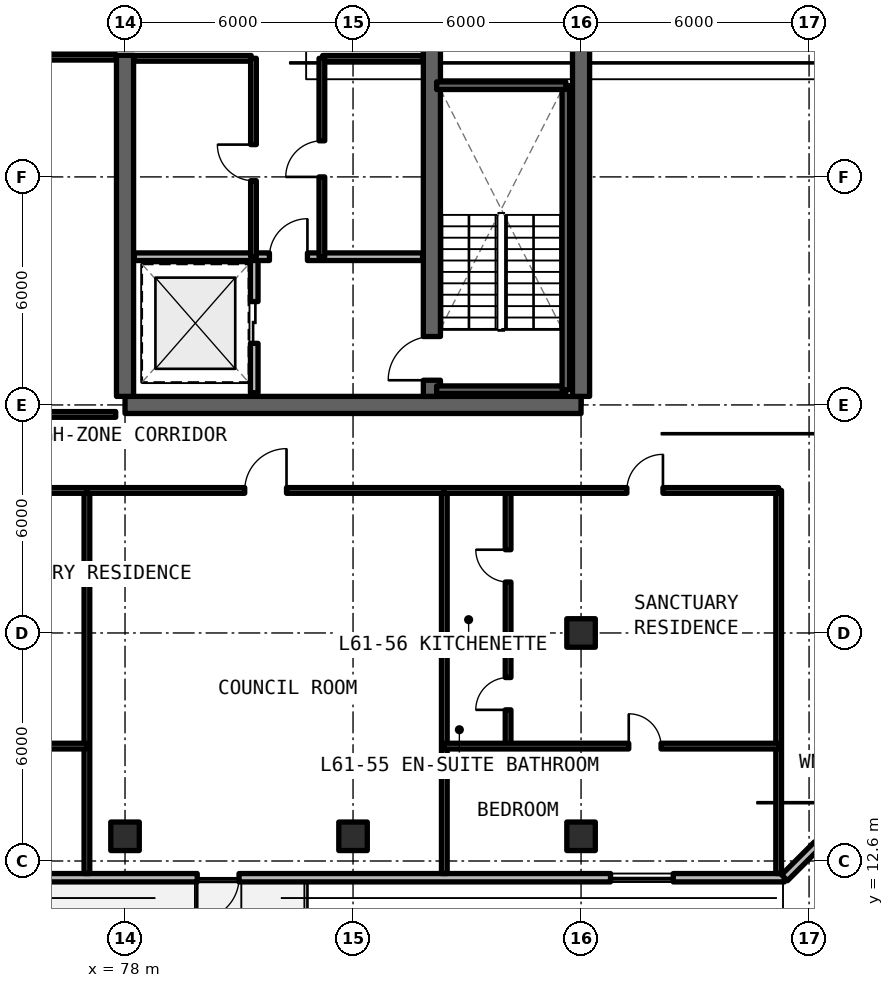
"""IFC4 building model, lengths in metres.
Left out: names, types, materials, properties, quantities, classifications, styles, units other than length and angle.
Written with IfcOpenShell. Run it as: python <this file> out.ifc"""

import sys

from ifc_helpers import new_model, si_unit, direction, frame, frame_2d, origin, origin_2d, place, context, subcontext, project, spatial, rectangle, extrude, element, fill, save


model = new_model("IFC4")
c1 = context("Model", 3, precision=1e-05, world=origin(), true_north=direction((0.0, 1.0)))
c2 = subcontext(c1, "Body", "Model", "MODEL_VIEW")
j1 = project(units=[si_unit("LENGTHUNIT", "METRE"), si_unit("PLANEANGLEUNIT", "RADIAN")], contexts=[c1])
p1 = place(None, origin())
s1 = spatial("IfcSite", under=j1, at=p1, CompositionType="ELEMENT")
p2 = place(p1, origin())
s2 = spatial("IfcBuilding", under=s1, at=p2, CompositionType="ELEMENT")
p3 = place(p2, frame((0.0, 0.0, 219.12)))
s3 = spatial("IfcBuildingStorey", under=s2, at=p3, CompositionType="ELEMENT", Elevation=219.12)
p4 = place(p3, frame((78.0, 24.6, 0.0), z_axis=(0.0, 0.0, 1.0), x_axis=(1.0, 0.0, 0.0)))
e1 = element("IfcWall", 1, at=p4, inside=s3, PredefinedType="SHEAR", context=c2, shape_type="SweptSolid", body=[
    extrude(rectangle(XDim=12.0, YDim=0.45, at=frame_2d((6.0, 0.0))), origin(), (0.0, 0.0, 1.0), 3.63),
])
p5 = place(p3, frame((90.0, 24.825, 0.0), z_axis=(0.0, 0.0, 1.0), x_axis=(0.0, 1.0, 0.0)))
e2 = element("IfcWall", 2, at=p5, inside=s3, PredefinedType="SHEAR", context=c2, shape_type="SweptSolid", body=[
    extrude(rectangle(XDim=17.55, YDim=0.45, at=frame_2d((8.775, 0.0))), origin(), (0.0, 0.0, 1.0), 3.63),
])
p6 = place(p3, frame((78.0, 24.825, 0.0), z_axis=(0.0, 0.0, 1.0), x_axis=(0.0, 1.0, 0.0)))
e3 = element("IfcWall", 3, at=p6, inside=s3, PredefinedType="SHEAR", context=c2, shape_type="SweptSolid", body=[
    extrude(rectangle(XDim=8.975, YDim=0.45, at=frame_2d((4.488, 0.0))), origin(), (0.0, 0.0, 1.0), 3.63),
])
p7 = place(p3, frame((86.075, 24.825, 0.0), z_axis=(0.0, 0.0, 1.0), x_axis=(0.0, 1.0, 0.0)))
e4 = element("IfcWall", 4, at=p7, inside=s3, PredefinedType="SHEAR", context=c2, shape_type="SweptSolid", body=[
    extrude(rectangle(XDim=17.55, YDim=0.45, at=frame_2d((8.775, 0.0))), origin(), (0.0, 0.0, 1.0), 3.63),
])
p8 = place(p7, frame((0.425, 0.0, 0.0)))
e5 = element("IfcOpeningElement", 5, at=p8, cuts=e4, PredefinedType="OPENING", context=c2, shape_type="SweptSolid", body=[
    extrude(rectangle(XDim=1.15, YDim=2.15, at=frame_2d((0.575, 1.075))), frame((0.0, 0.235, 0.0), z_axis=(0.0, -1.0, 0.0), x_axis=(1.0, 0.0, 0.0)), (0.0, 0.0, 1.0), 0.47),
])
p9 = place(p7, frame((9.625, 0.0, 0.0)))
e6 = element("IfcOpeningElement", 6, at=p9, cuts=e4, PredefinedType="OPENING", context=c2, shape_type="SweptSolid", body=[
    extrude(rectangle(XDim=1.15, YDim=2.15, at=frame_2d((0.575, 1.075))), frame((0.0, 0.235, 0.0), z_axis=(0.0, -1.0, 0.0), x_axis=(1.0, 0.0, 0.0)), (0.0, 0.0, 1.0), 0.47),
])
for number, where, z_axis, x_axis in (
    (7, (90.0, 18.6, 0.0), (0.0, 0.0, 1.0), (1.0, 0.0, 0.0)),
    (8, (78.0, 13.25, 0.0), (0.0, 0.0, 1.0), (1.0, 0.0, 0.0)),
    (9, (84.0, 13.25, 0.0), (0.0, 0.0, 1.0), (1.0, 0.0, 0.0)),
    (10, (90.0, 13.25, 0.0), (0.0, 0.0, 1.0), (1.0, 0.0, 0.0)),
):
    element("IfcColumn", number, at=place(p3, frame(where, z_axis=z_axis, x_axis=x_axis)), inside=s3, PredefinedType="COLUMN", context=c2, shape_type="SweptSolid", body=[
        extrude(rectangle(XDim=0.75, YDim=0.75, at=origin_2d()), origin(), (0.0, 0.0, 1.0), 3.63),
    ])
p10 = place(p3, frame((52.11, 12.16, 0.0), z_axis=(0.0, 0.0, 1.0), x_axis=(1.0, 0.0, 0.0)))
e11 = element("IfcWall", 11, at=p10, inside=s3, PredefinedType="SOLIDWALL", context=c2, shape_type="SweptSolid", body=[
    extrude(rectangle(XDim=43.244, YDim=0.22, at=frame_2d((21.622, 0.0))), origin(), (0.0, 0.0, 1.0), 3.41),
])
p11 = place(p10, frame((16.69, 0.0, 0.0)))
e12 = element("IfcOpeningElement", 12, at=p11, cuts=e11, PredefinedType="OPENING", context=c2, shape_type="SweptSolid", body=[
    extrude(rectangle(XDim=1.1, YDim=2.15, at=frame_2d((0.55, 1.075))), frame((0.0, 0.12, 0.0), z_axis=(0.0, -1.0, 0.0), x_axis=(1.0, 0.0, 0.0)), (0.0, 0.0, 1.0), 0.24),
])
p12 = place(p10, frame((27.79, 0.0, 0.0)))
e13 = element("IfcOpeningElement", 13, at=p12, cuts=e11, PredefinedType="OPENING", context=c2, shape_type="SweptSolid", body=[
    extrude(rectangle(XDim=1.1, YDim=2.15, at=frame_2d((0.55, 1.075))), frame((0.0, 0.12, 0.0), z_axis=(0.0, -1.0, 0.0), x_axis=(1.0, 0.0, 0.0)), (0.0, 0.0, 1.0), 0.24),
])
p13 = place(p10, frame((2.826, 0.0, 0.78)))
e14 = element("IfcOpeningElement", 14, at=p13, cuts=e11, PredefinedType="OPENING", context=c2, shape_type="SweptSolid", body=[
    extrude(rectangle(XDim=1.65, YDim=1.66, at=frame_2d((0.825, 0.83))), frame((0.0, 0.12, 0.0), z_axis=(0.0, -1.0, 0.0), x_axis=(1.0, 0.0, 0.0)), (0.0, 0.0, 1.0), 0.24),
])
p14 = place(p10, frame((10.865, 0.0, 0.78)))
e15 = element("IfcOpeningElement", 15, at=p14, cuts=e11, PredefinedType="OPENING", context=c2, shape_type="SweptSolid", body=[
    extrude(rectangle(XDim=1.65, YDim=1.66, at=frame_2d((0.825, 0.83))), frame((0.0, 0.12, 0.0), z_axis=(0.0, -1.0, 0.0), x_axis=(1.0, 0.0, 0.0)), (0.0, 0.0, 1.0), 0.24),
])
p15 = place(p10, frame((38.666, 0.0, 0.78)))
e16 = element("IfcOpeningElement", 16, at=p15, cuts=e11, PredefinedType="OPENING", context=c2, shape_type="SweptSolid", body=[
    extrude(rectangle(XDim=1.65, YDim=1.66, at=frame_2d((0.825, 0.83))), frame((0.0, 0.12, 0.0), z_axis=(0.0, -1.0, 0.0), x_axis=(1.0, 0.0, 0.0)), (0.0, 0.0, 1.0), 0.24),
])
p16 = place(p3, frame((95.354, 12.16, 0.0), z_axis=(0.0, 0.0, 1.0), x_axis=(0.707085909342, 0.707127652415, 0.0)))
e17 = element("IfcWall", 17, at=p16, inside=s3, PredefinedType="SOLIDWALL", context=c2, shape_type="SweptSolid", body=[
    extrude(rectangle(XDim=5.849, YDim=0.22, at=frame_2d((2.924, 0.0))), origin(), (0.0, 0.0, 1.0), 3.41),
])
p17 = place(p16, frame((1.224, 0.0, 0.78)))
e18 = element("IfcOpeningElement", 18, at=p17, cuts=e17, PredefinedType="OPENING", context=c2, shape_type="SweptSolid", body=[
    extrude(rectangle(XDim=3.4, YDim=1.66, at=frame_2d((1.7, 0.83))), frame((0.0, 0.12, 0.0), z_axis=(0.0, -1.0, 0.0), x_axis=(1.0, 0.0, 0.0)), (0.0, 0.0, 1.0), 0.24),
])
p18 = place(p3, frame((81.4, 24.92, 0.0), z_axis=(0.0, 0.0, 1.0), x_axis=(0.0, 1.0, 0.0)))
e19 = element("IfcWall", 19, at=p18, inside=s3, PredefinedType="SOLIDWALL", context=c2, shape_type="SweptSolid", body=[
    extrude(rectangle(XDim=3.58, YDim=0.2, at=frame_2d((1.79, 0.0))), origin(), (0.0, 0.0, 1.0), 2.63),
])
p19 = place(p18, frame((1.3, 0.0, 0.0)))
e20 = element("IfcOpeningElement", 20, at=p19, cuts=e19, PredefinedType="OPENING", context=c2, shape_type="SweptSolid", body=[
    extrude(rectangle(XDim=1.1, YDim=2.2, at=frame_2d((0.55, 1.1))), frame((0.0, 0.11, 0.0), z_axis=(0.0, -1.0, 0.0), x_axis=(1.0, 0.0, 0.0)), (0.0, 0.0, 1.0), 0.22),
])
p20 = place(p3, frame((78.245, 28.5, 0.0), z_axis=(0.0, 0.0, 1.0), x_axis=(1.0, 0.0, 0.0)))
e21 = element("IfcWall", 21, at=p20, inside=s3, PredefinedType="SOLIDWALL", context=c2, shape_type="SweptSolid", body=[
    extrude(rectangle(XDim=7.585, YDim=0.2, at=frame_2d((3.792, 0.0))), origin(), (0.0, 0.0, 1.0), 2.63),
])
p21 = place(p20, frame((3.555, 0.0, 0.0)))
e22 = element("IfcOpeningElement", 22, at=p21, cuts=e21, PredefinedType="OPENING", context=c2, shape_type="SweptSolid", body=[
    extrude(rectangle(XDim=1.0, YDim=2.15, at=frame_2d((0.5, 1.075))), frame((0.0, 0.11, 0.0), z_axis=(0.0, -1.0, 0.0), x_axis=(1.0, 0.0, 0.0)), (0.0, 0.0, 1.0), 0.22),
])
p22 = place(p3, frame((83.2, 33.72, 0.0), z_axis=(0.0, 0.0, 1.0), x_axis=(1.0, 0.0, 0.0)))
e23 = element("IfcWall", 23, at=p22, inside=s3, PredefinedType="SOLIDWALL", context=c2, shape_type="SweptSolid", body=[
    extrude(rectangle(XDim=2.63, YDim=0.15, at=frame_2d((1.315, 0.0))), origin(), (0.0, 0.0, 1.0), 2.63),
])
p23 = place(p3, frame((83.18, 28.5, 0.0), z_axis=(0.0, 0.0, 1.0), x_axis=(0.0, 1.0, 0.0)))
e24 = element("IfcWall", 24, at=p23, inside=s3, PredefinedType="SOLIDWALL", context=c2, shape_type="SweptSolid", body=[
    extrude(rectangle(XDim=5.22, YDim=0.15, at=frame_2d((2.61, 0.0))), origin(), (0.0, 0.0, 1.0), 2.63),
])
p24 = place(p23, frame((2.1, 0.0, 0.0)))
e25 = element("IfcOpeningElement", 25, at=p24, cuts=e24, PredefinedType="OPENING", context=c2, shape_type="SweptSolid", body=[
    extrude(rectangle(XDim=0.95, YDim=2.15, at=frame_2d((0.475, 1.075))), frame((0.0, 0.085, 0.0), z_axis=(0.0, -1.0, 0.0), x_axis=(1.0, 0.0, 0.0)), (0.0, 0.0, 1.0), 0.17),
])
p25 = place(p3, frame((78.245, 33.72, 0.0), z_axis=(0.0, 0.0, 1.0), x_axis=(1.0, 0.0, 0.0)))
e26 = element("IfcWall", 26, at=p25, inside=s3, PredefinedType="SOLIDWALL", context=c2, shape_type="SweptSolid", body=[
    extrude(rectangle(XDim=3.075, YDim=0.15, at=frame_2d((1.538, 0.0))), origin(), (0.0, 0.0, 1.0), 2.63),
])
p26 = place(p3, frame((81.38, 28.5, 0.0), z_axis=(0.0, 0.0, 1.0), x_axis=(0.0, 1.0, 0.0)))
e27 = element("IfcWall", 27, at=p26, inside=s3, PredefinedType="SOLIDWALL", context=c2, shape_type="SweptSolid", body=[
    extrude(rectangle(XDim=5.22, YDim=0.15, at=frame_2d((2.61, 0.0))), origin(), (0.0, 0.0, 1.0), 2.63),
])
p27 = place(p26, frame((2.0, 0.0, 0.0)))
e28 = element("IfcOpeningElement", 28, at=p27, cuts=e27, PredefinedType="OPENING", context=c2, shape_type="SweptSolid", body=[
    extrude(rectangle(XDim=0.95, YDim=2.15, at=frame_2d((0.475, 1.075))), frame((0.0, 0.085, 0.0), z_axis=(0.0, -1.0, 0.0), x_axis=(1.0, 0.0, 0.0)), (0.0, 0.0, 1.0), 0.17),
])
p28 = place(p3, frame((69.85, 24.35, 0.0), z_axis=(0.0, 0.0, 1.0), x_axis=(1.0, 0.0, 0.0)))
e29 = element("IfcWall", 29, at=p28, inside=s3, PredefinedType="SOLIDWALL", context=c2, shape_type="SweptSolid", body=[
    extrude(rectangle(XDim=7.905, YDim=0.15, at=frame_2d((3.952, 0.0))), origin(), (0.0, 0.0, 1.0), 2.63),
])
p29 = place(p3, frame((69.85, 33.75, 0.0), z_axis=(0.0, 0.0, 1.0), x_axis=(1.0, 0.0, 0.0)))
e30 = element("IfcWall", 30, at=p29, inside=s3, PredefinedType="SOLIDWALL", context=c2, shape_type="SweptSolid", body=[
    extrude(rectangle(XDim=7.905, YDim=0.15, at=frame_2d((3.952, 0.0))), origin(), (0.0, 0.0, 1.0), 2.63),
])
p30 = place(p29, frame((3.478, 0.0, 0.0)))
e31 = element("IfcOpeningElement", 31, at=p30, cuts=e30, PredefinedType="OPENING", context=c2, shape_type="SweptSolid", body=[
    extrude(rectangle(XDim=0.95, YDim=2.15, at=frame_2d((0.475, 1.075))), frame((0.0, 0.085, 0.0), z_axis=(0.0, -1.0, 0.0), x_axis=(1.0, 0.0, 0.0)), (0.0, 0.0, 1.0), 0.17),
])
for number, where, z_axis, x_axis in (
    (32, (95.2, 12.27, 0.0), (0.0, 0.0, 1.0), (0.0, 1.0, 0.0)),
    (33, (76.997, 12.27, 0.0), (0.0, 0.0, 1.0), (0.0, 1.0, 0.0)),
):
    element("IfcWall", number, at=place(p3, frame(where, z_axis=z_axis, x_axis=x_axis)), inside=s3, PredefinedType="SOLIDWALL", context=c2, shape_type="SweptSolid", body=[
        extrude(rectangle(XDim=10.08, YDim=0.15, at=frame_2d((5.04, 0.0))), origin(), (0.0, 0.0, 1.0), 2.63),
    ])
p31 = place(p3, frame((68.199, 15.623, 0.0), z_axis=(0.0, 0.0, 1.0), x_axis=(1.0, 0.0, 0.0)))
e34 = element("IfcWall", 34, at=p31, inside=s3, PredefinedType="PARTITIONING", context=c2, shape_type="SweptSolid", body=[
    extrude(rectangle(XDim=8.798, YDim=0.15, at=frame_2d((4.399, 0.0))), origin(), (0.0, 0.0, 1.0), 2.63),
])
p32 = place(p31, frame((4.954, 0.0, 0.0)))
e35 = element("IfcOpeningElement", 35, at=p32, cuts=e34, PredefinedType="OPENING", context=c2, shape_type="SweptSolid", body=[
    extrude(rectangle(XDim=0.85, YDim=2.1, at=frame_2d((0.425, 1.05))), frame((0.0, 0.085, 0.0), z_axis=(0.0, -1.0, 0.0), x_axis=(1.0, 0.0, 0.0)), (0.0, 0.0, 1.0), 0.17),
])
p33 = place(p3, frame((68.199, 22.35, 0.0), z_axis=(0.0, 0.0, 1.0), x_axis=(1.0, 0.0, 0.0)))
e36 = element("IfcWall", 36, at=p33, inside=s3, PredefinedType="SOLIDWALL", context=c2, shape_type="SweptSolid", body=[
    extrude(rectangle(XDim=8.798, YDim=0.15, at=frame_2d((4.399, 0.0))), origin(), (0.0, 0.0, 1.0), 2.63),
])
p34 = place(p33, frame((4.904, 0.0, 0.0)))
e37 = element("IfcOpeningElement", 37, at=p34, cuts=e36, PredefinedType="OPENING", context=c2, shape_type="SweptSolid", body=[
    extrude(rectangle(XDim=0.95, YDim=2.15, at=frame_2d((0.475, 1.075))), frame((0.0, 0.085, 0.0), z_axis=(0.0, -1.0, 0.0), x_axis=(1.0, 0.0, 0.0)), (0.0, 0.0, 1.0), 0.17),
])
p35 = place(p3, frame((86.402, 12.27, 0.0), z_axis=(0.0, 0.0, 1.0), x_axis=(0.0, 1.0, 0.0)))
e38 = element("IfcWall", 38, at=p35, inside=s3, PredefinedType="SOLIDWALL", context=c2, shape_type="SweptSolid", body=[
    extrude(rectangle(XDim=10.08, YDim=0.15, at=frame_2d((5.04, 0.0))), origin(), (0.0, 0.0, 1.0), 2.63),
])
p36 = place(p3, frame((76.997, 22.35, 0.0), z_axis=(0.0, 0.0, 1.0), x_axis=(1.0, 0.0, 0.0)))
e39 = element("IfcWall", 39, at=p36, inside=s3, PredefinedType="SOLIDWALL", context=c2, shape_type="SweptSolid", body=[
    extrude(rectangle(XDim=9.405, YDim=0.15, at=frame_2d((4.702, 0.0))), origin(), (0.0, 0.0, 1.0), 2.63),
])
p37 = place(p36, frame((4.152, 0.0, 0.0)))
e40 = element("IfcOpeningElement", 40, at=p37, cuts=e39, PredefinedType="OPENING", context=c2, shape_type="SweptSolid", body=[
    extrude(rectangle(XDim=1.1, YDim=2.15, at=frame_2d((0.55, 1.075))), frame((0.0, 0.085, 0.0), z_axis=(0.0, -1.0, 0.0), x_axis=(1.0, 0.0, 0.0)), (0.0, 0.0, 1.0), 0.17),
])
p38 = place(p3, frame((86.402, 18.381, 0.0), z_axis=(0.0, 0.0, 1.0), x_axis=(1.0, 0.0, 0.0)))
e41 = element("IfcWall", 41, at=p38, inside=s3, PredefinedType="PARTITIONING", context=c2, shape_type="SweptSolid", body=[
    extrude(rectangle(XDim=1.678, YDim=0.15, at=frame_2d((0.839, 0.0))), origin(), (0.0, 0.0, 1.0), 2.63),
])
p39 = place(p3, frame((88.08, 15.623, 0.0), z_axis=(0.0, 0.0, 1.0), x_axis=(0.0, 1.0, 0.0)))
e42 = element("IfcWall", 42, at=p39, inside=s3, PredefinedType="PARTITIONING", context=c2, shape_type="SweptSolid", body=[
    extrude(rectangle(XDim=6.727, YDim=0.15, at=frame_2d((3.364, 0.0))), origin(), (0.0, 0.0, 1.0), 2.63),
])
p40 = place(p39, frame((0.954, 0.0, 0.0)))
e43 = element("IfcOpeningElement", 43, at=p40, cuts=e42, PredefinedType="OPENING", context=c2, shape_type="SweptSolid", body=[
    extrude(rectangle(XDim=0.85, YDim=2.1, at=frame_2d((0.425, 1.05))), frame((0.0, 0.085, 0.0), z_axis=(0.0, -1.0, 0.0), x_axis=(1.0, 0.0, 0.0)), (0.0, 0.0, 1.0), 0.17),
])
p41 = place(p39, frame((4.318, 0.0, 0.0)))
e44 = element("IfcOpeningElement", 44, at=p41, cuts=e42, PredefinedType="OPENING", context=c2, shape_type="SweptSolid", body=[
    extrude(rectangle(XDim=0.85, YDim=2.1, at=frame_2d((0.425, 1.05))), frame((0.0, 0.085, 0.0), z_axis=(0.0, -1.0, 0.0), x_axis=(1.0, 0.0, 0.0)), (0.0, 0.0, 1.0), 0.17),
])
p42 = place(p3, frame((86.402, 15.623, 0.0), z_axis=(0.0, 0.0, 1.0), x_axis=(1.0, 0.0, 0.0)))
e45 = element("IfcWall", 45, at=p42, inside=s3, PredefinedType="PARTITIONING", context=c2, shape_type="SweptSolid", body=[
    extrude(rectangle(XDim=8.798, YDim=0.15, at=frame_2d((4.399, 0.0))), origin(), (0.0, 0.0, 1.0), 2.63),
])
p43 = place(p42, frame((4.853, 0.0, 0.0)))
e46 = element("IfcOpeningElement", 46, at=p43, cuts=e45, PredefinedType="OPENING", context=c2, shape_type="SweptSolid", body=[
    extrude(rectangle(XDim=0.85, YDim=2.1, at=frame_2d((0.425, 1.05))), frame((0.0, 0.085, 0.0), z_axis=(0.0, -1.0, 0.0), x_axis=(1.0, 0.0, 0.0)), (0.0, 0.0, 1.0), 0.17),
])
p44 = place(p3, frame((86.402, 22.35, 0.0), z_axis=(0.0, 0.0, 1.0), x_axis=(1.0, 0.0, 0.0)))
e47 = element("IfcWall", 47, at=p44, inside=s3, PredefinedType="SOLIDWALL", context=c2, shape_type="SweptSolid", body=[
    extrude(rectangle(XDim=8.798, YDim=0.15, at=frame_2d((4.399, 0.0))), origin(), (0.0, 0.0, 1.0), 2.63),
])
p45 = place(p44, frame((4.803, 0.0, 0.0)))
e48 = element("IfcOpeningElement", 48, at=p45, cuts=e47, PredefinedType="OPENING", context=c2, shape_type="SweptSolid", body=[
    extrude(rectangle(XDim=0.95, YDim=2.15, at=frame_2d((0.475, 1.075))), frame((0.0, 0.085, 0.0), z_axis=(0.0, -1.0, 0.0), x_axis=(1.0, 0.0, 0.0)), (0.0, 0.0, 1.0), 0.17),
])
p46 = place(p3, frame((86.2, 25.0, 0.0), z_axis=(0.0, 0.0, 1.0), x_axis=(1.0, 0.0, 0.0)))
e49 = element("IfcWall", 49, at=p46, inside=s3, PredefinedType="SOLIDWALL", context=c2, shape_type="SweptSolid", body=[
    extrude(rectangle(XDim=3.4, YDim=0.2, at=frame_2d((1.7, 0.0))), origin(), (0.0, 0.0, 1.0), 3.63),
])
p47 = place(p3, frame((89.6, 25.0, 0.0), z_axis=(0.0, 0.0, 1.0), x_axis=(0.0, 1.0, 0.0)))
e50 = element("IfcWall", 50, at=p47, inside=s3, PredefinedType="SOLIDWALL", context=c2, shape_type="SweptSolid", body=[
    extrude(rectangle(XDim=8.0, YDim=0.2, at=frame_2d((4.0, 0.0))), origin(), (0.0, 0.0, 1.0), 3.63),
])
p48 = place(p3, frame((89.6, 33.0, 0.0), z_axis=(0.0, 0.0, 1.0), x_axis=(-1.0, 0.0, 0.0)))
e51 = element("IfcWall", 51, at=p48, inside=s3, PredefinedType="SOLIDWALL", context=c2, shape_type="SweptSolid", body=[
    extrude(rectangle(XDim=3.4, YDim=0.2, at=frame_2d((1.7, 0.0))), origin(), (0.0, 0.0, 1.0), 3.63),
])
p49 = place(p12, frame((1.1, 0.0, 0.0), z_axis=(0.0, 0.0, 1.0), x_axis=(-1.0, 0.0, 0.0)))
e52 = element("IfcDoor", 52, at=p49, inside=s3, OperationType="SINGLE_SWING_LEFT", PredefinedType="DOOR", context=c2, shape_type="SweptSolid", body=[
    extrude(rectangle(XDim=1.1, YDim=2.15, at=frame_2d((0.55, 1.075))), frame((0.0, 0.025, 0.0), z_axis=(0.0, -1.0, 0.0), x_axis=(1.0, 0.0, 0.0)), (0.0, 0.0, 1.0), 0.05),
])
fill(e13, e52)
p50 = place(p15, origin())
e53 = element("IfcWindow", 53, at=p50, inside=s3, PartitioningType="SINGLE_PANEL", PredefinedType="WINDOW", context=c2, shape_type="SweptSolid", body=[
    extrude(rectangle(XDim=1.65, YDim=1.66, at=frame_2d((0.825, 0.83))), frame((0.0, 0.03, 0.0), z_axis=(0.0, -1.0, 0.0), x_axis=(1.0, 0.0, 0.0)), (0.0, 0.0, 1.0), 0.06),
])
fill(e16, e53)
p51 = place(p19, origin())
e54 = element("IfcDoor", 54, at=p51, inside=s3, OperationType="SLIDING_TO_LEFT", PredefinedType="DOOR", context=c2, shape_type="SweptSolid", body=[
    extrude(rectangle(XDim=1.1, YDim=2.2, at=frame_2d((0.55, 1.1))), frame((0.0, 0.025, 0.0), z_axis=(0.0, -1.0, 0.0), x_axis=(1.0, 0.0, 0.0)), (0.0, 0.0, 1.0), 0.05),
])
fill(e20, e54)
p52 = place(p21, origin())
e55 = element("IfcDoor", 55, at=p52, inside=s3, OperationType="SINGLE_SWING_RIGHT", PredefinedType="DOOR", context=c2, shape_type="SweptSolid", body=[
    extrude(rectangle(XDim=1.0, YDim=2.15, at=frame_2d((0.5, 1.075))), frame((0.0, 0.025, 0.0), z_axis=(0.0, -1.0, 0.0), x_axis=(1.0, 0.0, 0.0)), (0.0, 0.0, 1.0), 0.05),
])
fill(e22, e55)
p53 = place(p24, origin())
e56 = element("IfcDoor", 56, at=p53, inside=s3, OperationType="SINGLE_SWING_LEFT", PredefinedType="DOOR", context=c2, shape_type="SweptSolid", body=[
    extrude(rectangle(XDim=0.95, YDim=2.15, at=frame_2d((0.475, 1.075))), frame((0.0, 0.025, 0.0), z_axis=(0.0, -1.0, 0.0), x_axis=(1.0, 0.0, 0.0)), (0.0, 0.0, 1.0), 0.05),
])
fill(e25, e56)
p54 = place(p27, origin())
e57 = element("IfcDoor", 57, at=p54, inside=s3, OperationType="SINGLE_SWING_RIGHT", PredefinedType="DOOR", context=c2, shape_type="SweptSolid", body=[
    extrude(rectangle(XDim=0.95, YDim=2.15, at=frame_2d((0.475, 1.075))), frame((0.0, 0.025, 0.0), z_axis=(0.0, -1.0, 0.0), x_axis=(1.0, 0.0, 0.0)), (0.0, 0.0, 1.0), 0.05),
])
fill(e28, e57)
p55 = place(p37, origin())
e58 = element("IfcDoor", 58, at=p55, inside=s3, OperationType="SINGLE_SWING_RIGHT", PredefinedType="DOOR", context=c2, shape_type="SweptSolid", body=[
    extrude(rectangle(XDim=1.1, YDim=2.15, at=frame_2d((0.55, 1.075))), frame((0.0, 0.025, 0.0), z_axis=(0.0, -1.0, 0.0), x_axis=(1.0, 0.0, 0.0)), (0.0, 0.0, 1.0), 0.05),
])
fill(e40, e58)
p56 = place(p40, origin())
e59 = element("IfcDoor", 59, at=p56, inside=s3, OperationType="SINGLE_SWING_LEFT", PredefinedType="DOOR", context=c2, shape_type="SweptSolid", body=[
    extrude(rectangle(XDim=0.85, YDim=2.1, at=frame_2d((0.425, 1.05))), frame((0.0, 0.025, 0.0), z_axis=(0.0, -1.0, 0.0), x_axis=(1.0, 0.0, 0.0)), (0.0, 0.0, 1.0), 0.05),
])
fill(e43, e59)
p57 = place(p41, origin())
e60 = element("IfcDoor", 60, at=p57, inside=s3, OperationType="SINGLE_SWING_RIGHT", PredefinedType="DOOR", context=c2, shape_type="SweptSolid", body=[
    extrude(rectangle(XDim=0.85, YDim=2.1, at=frame_2d((0.425, 1.05))), frame((0.0, 0.025, 0.0), z_axis=(0.0, -1.0, 0.0), x_axis=(1.0, 0.0, 0.0)), (0.0, 0.0, 1.0), 0.05),
])
fill(e44, e60)
p58 = place(p43, origin())
e61 = element("IfcDoor", 61, at=p58, inside=s3, OperationType="SINGLE_SWING_LEFT", PredefinedType="DOOR", context=c2, shape_type="SweptSolid", body=[
    extrude(rectangle(XDim=0.85, YDim=2.1, at=frame_2d((0.425, 1.05))), frame((0.0, 0.025, 0.0), z_axis=(0.0, -1.0, 0.0), x_axis=(1.0, 0.0, 0.0)), (0.0, 0.0, 1.0), 0.05),
])
fill(e46, e61)
p59 = place(p45, origin())
e62 = element("IfcDoor", 62, at=p59, inside=s3, OperationType="SINGLE_SWING_RIGHT", PredefinedType="DOOR", context=c2, shape_type="SweptSolid", body=[
    extrude(rectangle(XDim=0.95, YDim=2.15, at=frame_2d((0.475, 1.075))), frame((0.0, 0.025, 0.0), z_axis=(0.0, -1.0, 0.0), x_axis=(1.0, 0.0, 0.0)), (0.0, 0.0, 1.0), 0.05),
])
fill(e48, e62)
p60 = place(p8, origin())
e63 = element("IfcDoor", 63, at=p60, inside=s3, OperationType="SINGLE_SWING_RIGHT", PredefinedType="DOOR", context=c2, shape_type="SweptSolid", body=[
    extrude(rectangle(XDim=1.15, YDim=2.15, at=frame_2d((0.575, 1.075))), frame((0.0, 0.025, 0.0), z_axis=(0.0, -1.0, 0.0), x_axis=(1.0, 0.0, 0.0)), (0.0, 0.0, 1.0), 0.05),
])
fill(e5, e63)
save(model, sys.argv[1])
